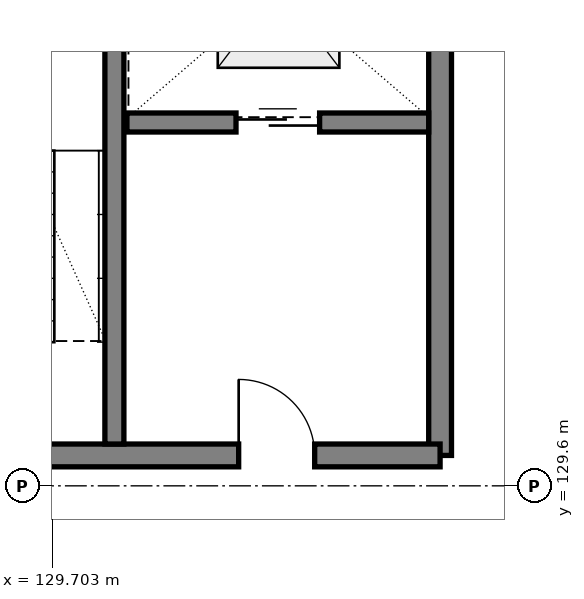
"""IFC4 building model, lengths in metres.
Left out: names, types, materials, properties, quantities, classifications, styles, units other than length and angle.
Written with IfcOpenShell. Run it as: python <this file> out.ifc"""

import sys

from ifc_helpers import new_model, si_unit, direction, frame, frame_2d, origin, place, context, subcontext, project, spatial, rectangle, extrude, element, fill, save


model = new_model("IFC4")
c1 = context("Model", 3, precision=1e-05, world=origin(), true_north=direction((0.0, 1.0)))
c2 = subcontext(c1, "Body", "Model", "MODEL_VIEW")
j1 = project(units=[si_unit("LENGTHUNIT", "METRE"), si_unit("PLANEANGLEUNIT", "RADIAN")], contexts=[c1])
p1 = place(None, origin())
s1 = spatial("IfcSite", under=j1, at=p1, CompositionType="ELEMENT")
p2 = place(p1, origin())
s2 = spatial("IfcBuilding", under=s1, at=p2, CompositionType="ELEMENT")
p3 = place(p2, frame((0.0, 0.0, 8.4)))
s3 = spatial("IfcBuildingStorey", under=s2, at=p3, CompositionType="ELEMENT", Elevation=8.4)
p4 = place(p3, frame((134.8, 130.0, 0.0), z_axis=(0.0, 0.0, 1.0), x_axis=(0.0, 1.0, 0.0)))
e1 = element("IfcWall", 1, at=p4, inside=s3, PredefinedType="SHEAR", context=c2, shape_type="SweptSolid", body=[
    extrude(rectangle(XDim=8.0, YDim=0.3, at=frame_2d((4.0, 0.0), x_axis=(1.0, 0.0))), origin(), (0.0, 0.0, 1.0), 3.6),
])
p5 = place(p3, frame((127.4, 130.0, 0.0), z_axis=(0.0, 0.0, 1.0), x_axis=(1.0, 0.0, 0.0)))
e2 = element("IfcWall", 2, at=p5, inside=s3, PredefinedType="SHEAR", context=c2, shape_type="SweptSolid", body=[
    extrude(rectangle(XDim=7.4, YDim=0.3, at=frame_2d((3.7, 0.0), x_axis=(1.0, 0.0))), origin(), (0.0, 0.0, 1.0), 3.6),
])
p6 = place(p5, frame((1.1, 0.0, 0.0)))
e3 = element("IfcOpeningElement", 3, at=p6, cuts=e2, PredefinedType="OPENING", context=c2, shape_type="SweptSolid", body=[
    extrude(rectangle(XDim=1.0, YDim=2.15, at=frame_2d((0.5, 1.075), x_axis=(1.0, 0.0))), frame((0.0, 0.16, 0.0), z_axis=(0.0, -1.0, 0.0), x_axis=(1.0, 0.0, 0.0)), (0.0, 0.0, 1.0), 0.32),
])
p7 = place(p5, frame((4.75, 0.0, 0.0)))
e4 = element("IfcOpeningElement", 4, at=p7, cuts=e2, PredefinedType="OPENING", context=c2, shape_type="SweptSolid", body=[
    extrude(rectangle(XDim=1.0, YDim=2.15, at=frame_2d((0.5, 1.075), x_axis=(1.0, 0.0))), frame((0.0, 0.16, 0.0), z_axis=(0.0, -1.0, 0.0), x_axis=(1.0, 0.0, 0.0)), (0.0, 0.0, 1.0), 0.32),
])
p8 = place(p3, frame((130.515, 130.15, 0.0), z_axis=(0.0, 0.0, 1.0), x_axis=(0.0, 1.0, 0.0)))
e5 = element("IfcWall", 5, at=p8, inside=s3, PredefinedType="SHEAR", context=c2, shape_type="SweptSolid", body=[
    extrude(rectangle(XDim=7.7, YDim=0.25, at=frame_2d((3.85, 0.0), x_axis=(1.0, 0.0))), origin(), (0.0, 0.0, 1.0), 3.6),
])
p9 = place(p3, frame((130.68, 134.38, 0.0), z_axis=(0.0, 0.0, 1.0), x_axis=(1.0, 0.0, 0.0)))
e6 = element("IfcWall", 6, at=p9, inside=s3, PredefinedType="SHEAR", context=c2, shape_type="SweptSolid", body=[
    extrude(rectangle(XDim=3.97, YDim=0.25, at=frame_2d((1.985, 0.0), x_axis=(1.0, 0.0))), origin(), (0.0, 0.0, 1.0), 3.36),
])
p10 = place(p9, frame((1.435, 0.0, 0.0)))
e7 = element("IfcOpeningElement", 7, at=p10, cuts=e6, PredefinedType="OPENING", context=c2, shape_type="SweptSolid", body=[
    extrude(rectangle(XDim=1.1, YDim=2.15, at=frame_2d((0.55, 1.075), x_axis=(1.0, 0.0))), frame((0.0, 0.135, 0.0), z_axis=(0.0, -1.0, 0.0), x_axis=(1.0, 0.0, 0.0)), (0.0, 0.0, 1.0), 0.27),
])
p11 = place(p7, origin())
e8 = element("IfcDoor", 8, at=p11, inside=s3, OperationType="SINGLE_SWING_LEFT", PredefinedType="DOOR", context=c2, shape_type="SweptSolid", body=[
    extrude(rectangle(XDim=1.0, YDim=2.15, at=frame_2d((0.5, 1.075), x_axis=(1.0, 0.0))), frame((0.0, 0.025, 0.0), z_axis=(0.0, -1.0, 0.0), x_axis=(1.0, 0.0, 0.0)), (0.0, 0.0, 1.0), 0.05),
])
fill(e4, e8)
p12 = place(p10, origin())
e9 = element("IfcDoor", 9, at=p12, inside=s3, OperationType="SLIDING_TO_LEFT", PredefinedType="DOOR", context=c2, shape_type="SweptSolid", body=[
    extrude(rectangle(XDim=1.1, YDim=2.15, at=frame_2d((0.55, 1.075), x_axis=(1.0, 0.0))), frame((0.0, 0.025, 0.0), z_axis=(0.0, -1.0, 0.0), x_axis=(1.0, 0.0, 0.0)), (0.0, 0.0, 1.0), 0.05),
])
fill(e7, e9)
save(model, sys.argv[1])
